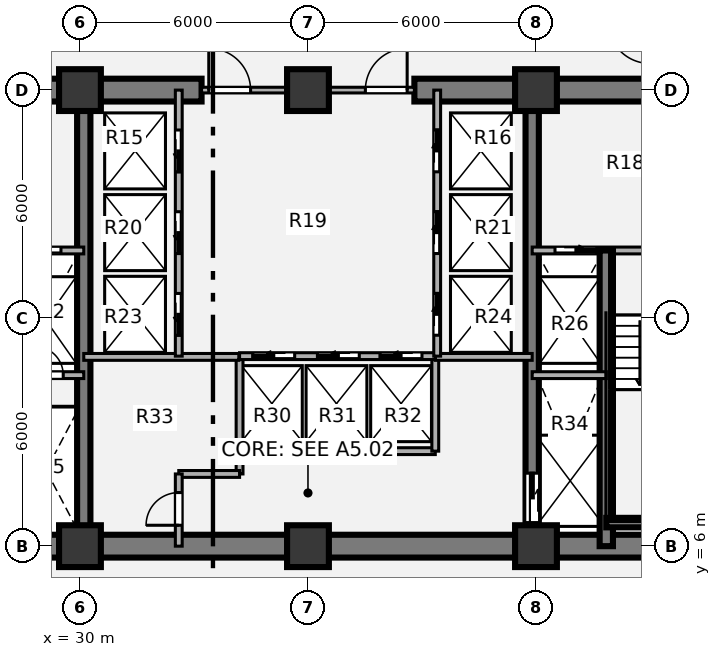
"""IFC4 building model, lengths in metres.
Left out: names, types, materials, properties, quantities, classifications, styles, units other than length and angle.
Written with IfcOpenShell. Run it as: python <this file> out.ifc"""

import sys

from ifc_helpers import new_model, si_unit, direction, frame, frame_2d, origin, origin_2d, place, context, subcontext, project, spatial, rectangle, extrude, source, transform, mapped, element, fill, save


model = new_model("IFC4")
c1 = context("Model", 3, precision=1e-05, world=origin(), true_north=direction((0.0, 1.0)))
c2 = subcontext(c1, "Body", "Model", "MODEL_VIEW")
j1 = project(units=[si_unit("LENGTHUNIT", "METRE"), si_unit("PLANEANGLEUNIT", "RADIAN")], contexts=[c1])
p1 = place(None, origin())
s1 = spatial("IfcSite", under=j1, at=p1, CompositionType="ELEMENT")
p2 = place(p1, origin())
s2 = spatial("IfcBuilding", under=s1, at=p2, CompositionType="ELEMENT")
p3 = place(p2, origin())
s3 = spatial("IfcBuildingStorey", under=s2, at=p3, CompositionType="ELEMENT", Elevation=0.0)
m1 = source(origin(), c2, "Body", "SweptSolid", [
    extrude(rectangle(XDim=1.1, YDim=1.1, at=origin_2d()), origin(), (0.0, 0.0, 1.0), 5.4),
])
for number, where, z_axis, x_axis in (
    (1, (30.0, 6.0, 0.0), (0.0, 0.0, 1.0), (1.0, 0.0, 0.0)),
    (2, (36.0, 6.0, 0.0), (0.0, 0.0, 1.0), (1.0, 0.0, 0.0)),
    (3, (42.0, 6.0, 0.0), (0.0, 0.0, 1.0), (1.0, 0.0, 0.0)),
    (4, (30.0, 18.0, 0.0), (0.0, 0.0, 1.0), (1.0, 0.0, 0.0)),
    (5, (36.0, 18.0, 0.0), (0.0, 0.0, 1.0), (1.0, 0.0, 0.0)),
    (6, (42.0, 18.0, 0.0), (0.0, 0.0, 1.0), (1.0, 0.0, 0.0)),
):
    element("IfcColumn", number, at=place(p3, frame(where, z_axis=z_axis, x_axis=x_axis)), inside=s3, PredefinedType="COLUMN", context=c2, shape_type="MappedRepresentation", body=[
        mapped(m1, transform((0.0, 0.0, 0.0), x_axis=(1.0, 0.0, 0.0), y_axis=(0.0, 1.0, 0.0), z_axis=(0.0, 0.0, 1.0), scale=1.0)),
    ])
p4 = place(p3, frame((48.3, 6.0, 0.0), z_axis=(0.0, 0.0, 1.0), x_axis=(-1.0, 0.0, 0.0)))
e7 = element("IfcWall", 7, at=p4, inside=s3, PredefinedType="SHEAR", context=c2, shape_type="SweptSolid", body=[
    extrude(rectangle(XDim=24.6, YDim=0.6, at=frame_2d((12.3, 0.0))), origin(), (0.0, 0.0, 1.0), 5.4),
])
p5 = place(p3, frame((23.7, 18.0, 0.0), z_axis=(0.0, 0.0, 1.0), x_axis=(1.0, 0.0, 0.0)))
e8 = element("IfcWall", 8, at=p5, inside=s3, PredefinedType="SHEAR", context=c2, shape_type="SweptSolid", body=[
    extrude(rectangle(XDim=9.5, YDim=0.6, at=frame_2d((4.75, 0.0))), origin(), (0.0, 0.0, 1.0), 5.4),
])
p6 = place(p5, frame((1.65, 0.0, 0.0)))
e9 = element("IfcOpeningElement", 9, at=p6, cuts=e8, PredefinedType="OPENING", context=c2, shape_type="SweptSolid", body=[
    extrude(rectangle(XDim=1.1, YDim=2.1, at=origin_2d()), frame((0.55, 0.31, 1.05), z_axis=(0.0, -1.0, 0.0), x_axis=(1.0, 0.0, 0.0)), (0.0, 0.0, 1.0), 0.62),
])
p7 = place(p3, frame((38.8, 18.0, 0.0), z_axis=(0.0, 0.0, 1.0), x_axis=(1.0, 0.0, 0.0)))
e10 = element("IfcWall", 10, at=p7, inside=s3, PredefinedType="SHEAR", context=c2, shape_type="SweptSolid", body=[
    extrude(rectangle(XDim=9.5, YDim=0.6, at=frame_2d((4.75, 0.0))), origin(), (0.0, 0.0, 1.0), 5.4),
])
p8 = place(p7, frame((6.75, 0.0, 0.0)))
e11 = element("IfcOpeningElement", 11, at=p8, cuts=e10, PredefinedType="OPENING", context=c2, shape_type="SweptSolid", body=[
    extrude(rectangle(XDim=1.1, YDim=2.1, at=origin_2d()), frame((0.55, 0.31, 1.05), z_axis=(0.0, -1.0, 0.0), x_axis=(1.0, 0.0, 0.0)), (0.0, 0.0, 1.0), 0.62),
])
p9 = place(p3, frame((30.1, 6.0, 0.0), z_axis=(0.0, 0.0, 1.0), x_axis=(0.0, 1.0, 0.0)))
e12 = element("IfcWall", 12, at=p9, inside=s3, PredefinedType="SHEAR", context=c2, shape_type="SweptSolid", body=[
    extrude(rectangle(XDim=12.0, YDim=0.35, at=frame_2d((6.0, 0.0))), origin(), (0.0, 0.0, 1.0), 5.4),
])
p10 = place(p3, frame((41.9, 18.0, 0.0), z_axis=(0.0, 0.0, 1.0), x_axis=(0.0, -1.0, 0.0)))
e13 = element("IfcWall", 13, at=p10, inside=s3, PredefinedType="SHEAR", context=c2, shape_type="SweptSolid", body=[
    extrude(rectangle(XDim=12.0, YDim=0.35, at=frame_2d((6.0, 0.0))), origin(), (0.0, 0.0, 1.0), 5.4),
])
p11 = place(p10, frame((10.08, 0.0, 0.0)))
e14 = element("IfcOpeningElement", 14, at=p11, cuts=e13, PredefinedType="OPENING", context=c2, shape_type="SweptSolid", body=[
    extrude(rectangle(XDim=1.3, YDim=2.1, at=origin_2d()), frame((0.65, 0.185, 1.05), z_axis=(0.0, -1.0, 0.0), x_axis=(1.0, 0.0, 0.0)), (0.0, 0.0, 1.0), 0.37),
])
p12 = place(p3, frame((34.2, 8.5, 0.0), z_axis=(0.0, 0.0, 1.0), x_axis=(1.0, 0.0, 0.0)))
e15 = element("IfcWall", 15, at=p12, inside=s3, PredefinedType="PARTITIONING", context=c2, shape_type="SweptSolid", body=[
    extrude(rectangle(XDim=5.15, YDim=0.18, at=frame_2d((2.575, 0.0))), origin(), (0.0, 0.0, 1.0), 5.09),
])
for number, where, z_axis, x_axis in (
    (16, (34.2, 8.5, 0.0), (0.0, 0.0, 1.0), (0.0, 1.0, 0.0)),
    (17, (39.35, 8.5, 0.0), (0.0, 0.0, 1.0), (0.0, 1.0, 0.0)),
):
    element("IfcWall", number, at=place(p3, frame(where, z_axis=z_axis, x_axis=x_axis)), inside=s3, PredefinedType="PARTITIONING", context=c2, shape_type="SweptSolid", body=[
        extrude(rectangle(XDim=2.5, YDim=0.18, at=frame_2d((1.25, 0.0))), origin(), (0.0, 0.0, 1.0), 5.09),
    ])
p13 = place(p3, frame((30.1, 10.98, 0.0), z_axis=(0.0, 0.0, 1.0), x_axis=(1.0, 0.0, 0.0)))
e18 = element("IfcWall", 18, at=p13, inside=s3, PredefinedType="PARTITIONING", context=c2, shape_type="SweptSolid", body=[
    extrude(rectangle(XDim=4.08, YDim=0.18, at=frame_2d((2.04, 0.0))), origin(), (0.0, 0.0, 1.0), 5.09),
])
p14 = place(p3, frame((34.2, 7.9, 0.0), z_axis=(0.0, 0.0, 1.0), x_axis=(0.0, 1.0, 0.0)))
e19 = element("IfcWall", 19, at=p14, inside=s3, PredefinedType="PARTITIONING", context=c2, shape_type="SweptSolid", body=[
    extrude(rectangle(XDim=0.6, YDim=0.18, at=frame_2d((0.3, 0.0))), origin(), (0.0, 0.0, 1.0), 5.09),
])
p15 = place(p3, frame((32.6, 7.9, 0.0), z_axis=(0.0, 0.0, 1.0), x_axis=(1.0, 0.0, 0.0)))
e20 = element("IfcWall", 20, at=p15, inside=s3, PredefinedType="PARTITIONING", context=c2, shape_type="SweptSolid", body=[
    extrude(rectangle(XDim=1.6, YDim=0.18, at=frame_2d((0.8, 0.0))), origin(), (0.0, 0.0, 1.0), 5.09),
])
p16 = place(p3, frame((32.6, 6.0, 0.0), z_axis=(0.0, 0.0, 1.0), x_axis=(0.0, 1.0, 0.0)))
e21 = element("IfcWall", 21, at=p16, inside=s3, PredefinedType="PARTITIONING", context=c2, shape_type="SweptSolid", body=[
    extrude(rectangle(XDim=1.9, YDim=0.18, at=frame_2d((0.95, 0.0))), origin(), (0.0, 0.0, 1.0), 5.09),
])
p17 = place(p16, frame((0.55, 0.0, 0.0)))
e22 = element("IfcOpeningElement", 22, at=p17, cuts=e21, PredefinedType="OPENING", context=c2, shape_type="SweptSolid", body=[
    extrude(rectangle(XDim=0.86, YDim=2.1, at=origin_2d()), frame((0.43, 0.1, 1.05), z_axis=(0.0, -1.0, 0.0), x_axis=(1.0, 0.0, 0.0)), (0.0, 0.0, 1.0), 0.2),
])
p18 = place(p3, frame((39.35, 10.98, 0.0), z_axis=(0.0, 0.0, 1.0), x_axis=(1.0, 0.0, 0.0)))
e23 = element("IfcWall", 23, at=p18, inside=s3, PredefinedType="PARTITIONING", context=c2, shape_type="SweptSolid", body=[
    extrude(rectangle(XDim=2.55, YDim=0.18, at=frame_2d((1.275, 0.0))), origin(), (0.0, 0.0, 1.0), 5.09),
])
p19 = place(p3, frame((33.2, 18.0, 0.0), z_axis=(0.0, 0.0, 1.0), x_axis=(1.0, 0.0, 0.0)))
e24 = element("IfcWall", 24, at=p19, inside=s3, PredefinedType="PARTITIONING", context=c2, shape_type="SweptSolid", body=[
    extrude(rectangle(XDim=5.6, YDim=0.15, at=frame_2d((2.8, 0.0))), origin(), (0.0, 0.0, 1.0), 3.905),
])
p20 = place(p19, frame((0.19, 0.0, 0.0)))
e25 = element("IfcOpeningElement", 25, at=p20, cuts=e24, PredefinedType="OPENING", context=c2, shape_type="SweptSolid", body=[
    extrude(rectangle(XDim=1.1, YDim=2.1, at=origin_2d()), frame((0.55, 0.085, 1.05), z_axis=(0.0, -1.0, 0.0), x_axis=(1.0, 0.0, 0.0)), (0.0, 0.0, 1.0), 0.17),
])
p21 = place(p19, frame((4.31, 0.0, 0.0)))
e26 = element("IfcOpeningElement", 26, at=p21, cuts=e24, PredefinedType="OPENING", context=c2, shape_type="SweptSolid", body=[
    extrude(rectangle(XDim=1.1, YDim=2.1, at=origin_2d()), frame((0.55, 0.085, 1.05), z_axis=(0.0, -1.0, 0.0), x_axis=(1.0, 0.0, 0.0)), (0.0, 0.0, 1.0), 0.17),
])
p22 = place(p3, frame((24.0, 13.78, 0.0), z_axis=(0.0, 0.0, 1.0), x_axis=(1.0, 0.0, 0.0)))
e27 = element("IfcWall", 27, at=p22, inside=s3, PredefinedType="PARTITIONING", context=c2, shape_type="SweptSolid", body=[
    extrude(rectangle(XDim=6.1, YDim=0.18, at=frame_2d((3.05, 0.0))), origin(), (0.0, 0.0, 1.0), 2.229),
])
p23 = place(p22, frame((1.15, 0.0, 0.0)))
e28 = element("IfcOpeningElement", 28, at=p23, cuts=e27, PredefinedType="OPENING", context=c2, shape_type="SweptSolid", body=[
    extrude(rectangle(XDim=1.1, YDim=2.1, at=origin_2d()), frame((0.55, 0.1, 1.05), z_axis=(0.0, -1.0, 0.0), x_axis=(1.0, 0.0, 0.0)), (0.0, 0.0, 1.0), 0.2),
])
p24 = place(p22, frame((4.4, 0.0, 0.0)))
e29 = element("IfcOpeningElement", 29, at=p24, cuts=e27, PredefinedType="OPENING", context=c2, shape_type="SweptSolid", body=[
    extrude(rectangle(XDim=1.1, YDim=2.1, at=origin_2d()), frame((0.55, 0.1, 1.05), z_axis=(0.0, -1.0, 0.0), x_axis=(1.0, 0.0, 0.0)), (0.0, 0.0, 1.0), 0.2),
])
p25 = place(p3, frame((28.15, 10.5, 0.0), z_axis=(0.0, 0.0, 1.0), x_axis=(1.0, 0.0, 0.0)))
e30 = element("IfcWall", 30, at=p25, inside=s3, PredefinedType="PARTITIONING", context=c2, shape_type="SweptSolid", body=[
    extrude(rectangle(XDim=1.95, YDim=0.18, at=frame_2d((0.975, 0.0))), origin(), (0.0, 0.0, 1.0), 5.09),
])
p26 = place(p25, frame((0.65, 0.0, 0.0)))
e31 = element("IfcOpeningElement", 31, at=p26, cuts=e30, PredefinedType="OPENING", context=c2, shape_type="SweptSolid", body=[
    extrude(rectangle(XDim=0.76, YDim=2.05, at=origin_2d()), frame((0.38, 0.1, 1.025), z_axis=(0.0, -1.0, 0.0), x_axis=(1.0, 0.0, 0.0)), (0.0, 0.0, 1.0), 0.2),
])
p27 = place(p3, frame((41.9, 13.78, 0.0), z_axis=(0.0, 0.0, 1.0), x_axis=(1.0, 0.0, 0.0)))
e32 = element("IfcWall", 32, at=p27, inside=s3, PredefinedType="PARTITIONING", context=c2, shape_type="SweptSolid", body=[
    extrude(rectangle(XDim=6.1, YDim=0.18, at=frame_2d((3.05, 0.0))), origin(), (0.0, 0.0, 1.0), 2.229),
])
p28 = place(p27, frame((0.6, 0.0, 0.0)))
e33 = element("IfcOpeningElement", 33, at=p28, cuts=e32, PredefinedType="OPENING", context=c2, shape_type="SweptSolid", body=[
    extrude(rectangle(XDim=1.1, YDim=2.1, at=origin_2d()), frame((0.55, 0.1, 1.05), z_axis=(0.0, -1.0, 0.0), x_axis=(1.0, 0.0, 0.0)), (0.0, 0.0, 1.0), 0.2),
])
p29 = place(p27, frame((3.8, 0.0, 0.0)))
e34 = element("IfcOpeningElement", 34, at=p29, cuts=e32, PredefinedType="OPENING", context=c2, shape_type="SweptSolid", body=[
    extrude(rectangle(XDim=1.1, YDim=2.1, at=origin_2d()), frame((0.55, 0.1, 1.05), z_axis=(0.0, -1.0, 0.0), x_axis=(1.0, 0.0, 0.0)), (0.0, 0.0, 1.0), 0.2),
])
p30 = place(p3, frame((43.85, 6.0, 0.0), z_axis=(0.0, 0.0, 1.0), x_axis=(0.0, 1.0, 0.0)))
e35 = element("IfcWall", 35, at=p30, inside=s3, PredefinedType="SHEAR", context=c2, shape_type="SweptSolid", body=[
    extrude(rectangle(XDim=7.78, YDim=0.35, at=frame_2d((3.89, 0.0))), origin(), (0.0, 0.0, 1.0), 5.44),
])
p31 = place(p3, frame((43.85, 6.62, 0.0), z_axis=(0.0, 0.0, 1.0), x_axis=(1.0, 0.0, 0.0)))
e36 = element("IfcWall", 36, at=p31, inside=s3, PredefinedType="SHEAR", context=c2, shape_type="SweptSolid", body=[
    extrude(rectangle(XDim=3.57, YDim=0.25, at=frame_2d((1.785, 0.0))), origin(), (0.0, 0.0, 1.0), 5.44),
])
p32 = place(p3, frame((41.9, 10.5, 0.0), z_axis=(0.0, 0.0, 1.0), x_axis=(1.0, 0.0, 0.0)))
e37 = element("IfcWall", 37, at=p32, inside=s3, PredefinedType="PARTITIONING", context=c2, shape_type="SweptSolid", body=[
    extrude(rectangle(XDim=1.95, YDim=0.18, at=frame_2d((0.975, 0.0))), origin(), (0.0, 0.0, 1.0), 5.09),
])
p33 = place(p3, frame((32.6, 11.0, 0.0), z_axis=(0.0, 0.0, 1.0), x_axis=(0.0, 1.0, 0.0)))
e38 = element("IfcWall", 38, at=p33, inside=s3, PredefinedType="PARTITIONING", context=c2, shape_type="SweptSolid", body=[
    extrude(rectangle(XDim=7.0, YDim=0.18, at=frame_2d((3.5, 0.0))), origin(), (0.0, 0.0, 1.0), 5.09),
])
p34 = place(p33, frame((0.55, 0.0, 0.0)))
e39 = element("IfcOpeningElement", 39, at=p34, cuts=e38, PredefinedType="OPENING", context=c2, shape_type="SweptSolid", body=[
    extrude(rectangle(XDim=1.1, YDim=2.1, at=origin_2d()), frame((0.55, 0.1, 1.05), z_axis=(0.0, -1.0, 0.0), x_axis=(1.0, 0.0, 0.0)), (0.0, 0.0, 1.0), 0.2),
])
p35 = place(p33, frame((2.7, 0.0, 0.0)))
e40 = element("IfcOpeningElement", 40, at=p35, cuts=e38, PredefinedType="OPENING", context=c2, shape_type="SweptSolid", body=[
    extrude(rectangle(XDim=1.1, YDim=2.1, at=origin_2d()), frame((0.55, 0.1, 1.05), z_axis=(0.0, -1.0, 0.0), x_axis=(1.0, 0.0, 0.0)), (0.0, 0.0, 1.0), 0.2),
])
p36 = place(p33, frame((4.85, 0.0, 0.0)))
e41 = element("IfcOpeningElement", 41, at=p36, cuts=e38, PredefinedType="OPENING", context=c2, shape_type="SweptSolid", body=[
    extrude(rectangle(XDim=1.1, YDim=2.1, at=origin_2d()), frame((0.55, 0.1, 1.05), z_axis=(0.0, -1.0, 0.0), x_axis=(1.0, 0.0, 0.0)), (0.0, 0.0, 1.0), 0.2),
])
p37 = place(p3, frame((34.2, 11.0, 0.0), z_axis=(0.0, 0.0, 1.0), x_axis=(1.0, 0.0, 0.0)))
e42 = element("IfcWall", 42, at=p37, inside=s3, PredefinedType="PARTITIONING", context=c2, shape_type="SweptSolid", body=[
    extrude(rectangle(XDim=5.15, YDim=0.18, at=frame_2d((2.575, 0.0))), origin(), (0.0, 0.0, 1.0), 5.09),
])
p38 = place(p37, frame((0.35, 0.0, 0.0)))
e43 = element("IfcOpeningElement", 43, at=p38, cuts=e42, PredefinedType="OPENING", context=c2, shape_type="SweptSolid", body=[
    extrude(rectangle(XDim=1.1, YDim=2.1, at=origin_2d()), frame((0.55, 0.1, 1.05), z_axis=(0.0, -1.0, 0.0), x_axis=(1.0, 0.0, 0.0)), (0.0, 0.0, 1.0), 0.2),
])
p39 = place(p37, frame((2.05, 0.0, 0.0)))
e44 = element("IfcOpeningElement", 44, at=p39, cuts=e42, PredefinedType="OPENING", context=c2, shape_type="SweptSolid", body=[
    extrude(rectangle(XDim=1.1, YDim=2.1, at=origin_2d()), frame((0.55, 0.1, 1.05), z_axis=(0.0, -1.0, 0.0), x_axis=(1.0, 0.0, 0.0)), (0.0, 0.0, 1.0), 0.2),
])
p40 = place(p37, frame((3.7, 0.0, 0.0)))
e45 = element("IfcOpeningElement", 45, at=p40, cuts=e42, PredefinedType="OPENING", context=c2, shape_type="SweptSolid", body=[
    extrude(rectangle(XDim=1.1, YDim=2.1, at=origin_2d()), frame((0.55, 0.1, 1.05), z_axis=(0.0, -1.0, 0.0), x_axis=(1.0, 0.0, 0.0)), (0.0, 0.0, 1.0), 0.2),
])
p41 = place(p3, frame((39.4, 11.0, 0.0), z_axis=(0.0, 0.0, 1.0), x_axis=(0.0, 1.0, 0.0)))
e46 = element("IfcWall", 46, at=p41, inside=s3, PredefinedType="PARTITIONING", context=c2, shape_type="SweptSolid", body=[
    extrude(rectangle(XDim=7.0, YDim=0.18, at=frame_2d((3.5, 0.0))), origin(), (0.0, 0.0, 1.0), 5.09),
])
p42 = place(p41, frame((0.55, 0.0, 0.0)))
e47 = element("IfcOpeningElement", 47, at=p42, cuts=e46, PredefinedType="OPENING", context=c2, shape_type="SweptSolid", body=[
    extrude(rectangle(XDim=1.1, YDim=2.1, at=origin_2d()), frame((0.55, 0.1, 1.05), z_axis=(0.0, -1.0, 0.0), x_axis=(1.0, 0.0, 0.0)), (0.0, 0.0, 1.0), 0.2),
])
p43 = place(p41, frame((2.7, 0.0, 0.0)))
e48 = element("IfcOpeningElement", 48, at=p43, cuts=e46, PredefinedType="OPENING", context=c2, shape_type="SweptSolid", body=[
    extrude(rectangle(XDim=1.1, YDim=2.1, at=origin_2d()), frame((0.55, 0.1, 1.05), z_axis=(0.0, -1.0, 0.0), x_axis=(1.0, 0.0, 0.0)), (0.0, 0.0, 1.0), 0.2),
])
p44 = place(p41, frame((4.85, 0.0, 0.0)))
e49 = element("IfcOpeningElement", 49, at=p44, cuts=e46, PredefinedType="OPENING", context=c2, shape_type="SweptSolid", body=[
    extrude(rectangle(XDim=1.1, YDim=2.1, at=origin_2d()), frame((0.55, 0.1, 1.05), z_axis=(0.0, -1.0, 0.0), x_axis=(1.0, 0.0, 0.0)), (0.0, 0.0, 1.0), 0.2),
])
m2 = source(origin(), c2, "Body", "SweptSolid", [
    extrude(rectangle(XDim=0.86, YDim=2.1, at=origin_2d()), frame((0.43, 0.025, 1.05), z_axis=(0.0, -1.0, 0.0), x_axis=(1.0, 0.0, 0.0)), (0.0, 0.0, 1.0), 0.05),
])
p45 = place(p17, origin())
e50 = element("IfcDoor", 50, at=p45, inside=s3, OperationType="SINGLE_SWING_LEFT", PredefinedType="DOOR", context=c2, shape_type="MappedRepresentation", body=[
    mapped(m2, transform((0.0, 0.0, 0.0), x_axis=(1.0, 0.0, 0.0), y_axis=(0.0, 1.0, 0.0), z_axis=(0.0, 0.0, 1.0), scale=1.0)),
])
fill(e22, e50)
m3 = source(origin(), c2, "Body", "SweptSolid", [
    extrude(rectangle(XDim=1.1, YDim=2.1, at=origin_2d()), frame((0.55, 0.025, 1.05), z_axis=(0.0, -1.0, 0.0), x_axis=(1.0, 0.0, 0.0)), (0.0, 0.0, 1.0), 0.05),
])
p46 = place(p20, origin())
e51 = element("IfcDoor", 51, at=p46, inside=s3, OperationType="SINGLE_SWING_LEFT", PredefinedType="DOOR", context=c2, shape_type="MappedRepresentation", body=[
    mapped(m3, transform((0.0, 0.0, 0.0), x_axis=(1.0, 0.0, 0.0), y_axis=(0.0, 1.0, 0.0), z_axis=(0.0, 0.0, 1.0), scale=1.0)),
])
fill(e25, e51)
p47 = place(p21, origin())
e52 = element("IfcDoor", 52, at=p47, inside=s3, OperationType="SINGLE_SWING_RIGHT", PredefinedType="DOOR", context=c2, shape_type="MappedRepresentation", body=[
    mapped(m3, transform((0.0, 0.0, 0.0), x_axis=(1.0, 0.0, 0.0), y_axis=(0.0, 1.0, 0.0), z_axis=(0.0, 0.0, 1.0), scale=1.0)),
])
fill(e26, e52)
m4 = source(origin(), c2, "Body", "SweptSolid", [
    extrude(rectangle(XDim=1.1, YDim=2.1, at=origin_2d()), frame((0.55, 0.025, 1.05), z_axis=(0.0, -1.0, 0.0), x_axis=(1.0, 0.0, 0.0)), (0.0, 0.0, 1.0), 0.05),
])
p48 = place(p24, origin())
e53 = element("IfcDoor", 53, at=p48, inside=s3, OperationType="SLIDING_TO_LEFT", PredefinedType="DOOR", context=c2, shape_type="MappedRepresentation", body=[
    mapped(m4, transform((0.0, 0.0, 0.0), x_axis=(1.0, 0.0, 0.0), y_axis=(0.0, 1.0, 0.0), z_axis=(0.0, 0.0, 1.0), scale=1.0)),
])
fill(e29, e53)
m5 = source(origin(), c2, "Body", "SweptSolid", [
    extrude(rectangle(XDim=0.76, YDim=2.05, at=origin_2d()), frame((0.38, 0.025, 1.025), z_axis=(0.0, -1.0, 0.0), x_axis=(1.0, 0.0, 0.0)), (0.0, 0.0, 1.0), 0.05),
])
p49 = place(p26, origin())
e54 = element("IfcDoor", 54, at=p49, inside=s3, OperationType="SINGLE_SWING_LEFT", PredefinedType="DOOR", context=c2, shape_type="MappedRepresentation", body=[
    mapped(m5, transform((0.0, 0.0, 0.0), x_axis=(1.0, 0.0, 0.0), y_axis=(0.0, 1.0, 0.0), z_axis=(0.0, 0.0, 1.0), scale=1.0)),
])
fill(e31, e54)
p50 = place(p28, origin())
e55 = element("IfcDoor", 55, at=p50, inside=s3, OperationType="SLIDING_TO_RIGHT", PredefinedType="DOOR", context=c2, shape_type="MappedRepresentation", body=[
    mapped(m4, transform((0.0, 0.0, 0.0), x_axis=(1.0, 0.0, 0.0), y_axis=(0.0, 1.0, 0.0), z_axis=(0.0, 0.0, 1.0), scale=1.0)),
])
fill(e33, e55)
m6 = source(origin(), c2, "Body", "SweptSolid", [
    extrude(rectangle(XDim=1.3, YDim=2.1, at=origin_2d()), frame((0.65, 0.025, 1.05), z_axis=(0.0, -1.0, 0.0), x_axis=(1.0, 0.0, 0.0)), (0.0, 0.0, 1.0), 0.05),
])
p51 = place(p11, origin())
e56 = element("IfcDoor", 56, at=p51, inside=s3, OperationType="SLIDING_TO_LEFT", PredefinedType="DOOR", context=c2, shape_type="MappedRepresentation", body=[
    mapped(m6, transform((0.0, 0.0, 0.0), x_axis=(1.0, 0.0, 0.0), y_axis=(0.0, 1.0, 0.0), z_axis=(0.0, 0.0, 1.0), scale=1.0)),
])
fill(e14, e56)
p52 = place(p34, origin())
e57 = element("IfcDoor", 57, at=p52, inside=s3, OperationType="SLIDING_TO_LEFT", PredefinedType="DOOR", context=c2, shape_type="MappedRepresentation", body=[
    mapped(m4, transform((0.0, 0.0, 0.0), x_axis=(1.0, 0.0, 0.0), y_axis=(0.0, 1.0, 0.0), z_axis=(0.0, 0.0, 1.0), scale=1.0)),
])
fill(e39, e57)
p53 = place(p35, origin())
e58 = element("IfcDoor", 58, at=p53, inside=s3, OperationType="SLIDING_TO_LEFT", PredefinedType="DOOR", context=c2, shape_type="MappedRepresentation", body=[
    mapped(m4, transform((0.0, 0.0, 0.0), x_axis=(1.0, 0.0, 0.0), y_axis=(0.0, 1.0, 0.0), z_axis=(0.0, 0.0, 1.0), scale=1.0)),
])
fill(e40, e58)
p54 = place(p36, origin())
e59 = element("IfcDoor", 59, at=p54, inside=s3, OperationType="SLIDING_TO_LEFT", PredefinedType="DOOR", context=c2, shape_type="MappedRepresentation", body=[
    mapped(m4, transform((0.0, 0.0, 0.0), x_axis=(1.0, 0.0, 0.0), y_axis=(0.0, 1.0, 0.0), z_axis=(0.0, 0.0, 1.0), scale=1.0)),
])
fill(e41, e59)
p55 = place(p38, origin())
e60 = element("IfcDoor", 60, at=p55, inside=s3, OperationType="SLIDING_TO_LEFT", PredefinedType="DOOR", context=c2, shape_type="MappedRepresentation", body=[
    mapped(m4, transform((0.0, 0.0, 0.0), x_axis=(1.0, 0.0, 0.0), y_axis=(0.0, 1.0, 0.0), z_axis=(0.0, 0.0, 1.0), scale=1.0)),
])
fill(e43, e60)
p56 = place(p39, origin())
e61 = element("IfcDoor", 61, at=p56, inside=s3, OperationType="SLIDING_TO_LEFT", PredefinedType="DOOR", context=c2, shape_type="MappedRepresentation", body=[
    mapped(m4, transform((0.0, 0.0, 0.0), x_axis=(1.0, 0.0, 0.0), y_axis=(0.0, 1.0, 0.0), z_axis=(0.0, 0.0, 1.0), scale=1.0)),
])
fill(e44, e61)
p57 = place(p40, origin())
e62 = element("IfcDoor", 62, at=p57, inside=s3, OperationType="SLIDING_TO_LEFT", PredefinedType="DOOR", context=c2, shape_type="MappedRepresentation", body=[
    mapped(m4, transform((0.0, 0.0, 0.0), x_axis=(1.0, 0.0, 0.0), y_axis=(0.0, 1.0, 0.0), z_axis=(0.0, 0.0, 1.0), scale=1.0)),
])
fill(e45, e62)
p58 = place(p42, origin())
e63 = element("IfcDoor", 63, at=p58, inside=s3, OperationType="SLIDING_TO_RIGHT", PredefinedType="DOOR", context=c2, shape_type="MappedRepresentation", body=[
    mapped(m4, transform((0.0, 0.0, 0.0), x_axis=(1.0, 0.0, 0.0), y_axis=(0.0, 1.0, 0.0), z_axis=(0.0, 0.0, 1.0), scale=1.0)),
])
fill(e47, e63)
p59 = place(p43, origin())
e64 = element("IfcDoor", 64, at=p59, inside=s3, OperationType="SLIDING_TO_RIGHT", PredefinedType="DOOR", context=c2, shape_type="MappedRepresentation", body=[
    mapped(m4, transform((0.0, 0.0, 0.0), x_axis=(1.0, 0.0, 0.0), y_axis=(0.0, 1.0, 0.0), z_axis=(0.0, 0.0, 1.0), scale=1.0)),
])
fill(e48, e64)
p60 = place(p44, origin())
e65 = element("IfcDoor", 65, at=p60, inside=s3, OperationType="SLIDING_TO_RIGHT", PredefinedType="DOOR", context=c2, shape_type="MappedRepresentation", body=[
    mapped(m4, transform((0.0, 0.0, 0.0), x_axis=(1.0, 0.0, 0.0), y_axis=(0.0, 1.0, 0.0), z_axis=(0.0, 0.0, 1.0), scale=1.0)),
])
fill(e49, e65)
save(model, sys.argv[1])
